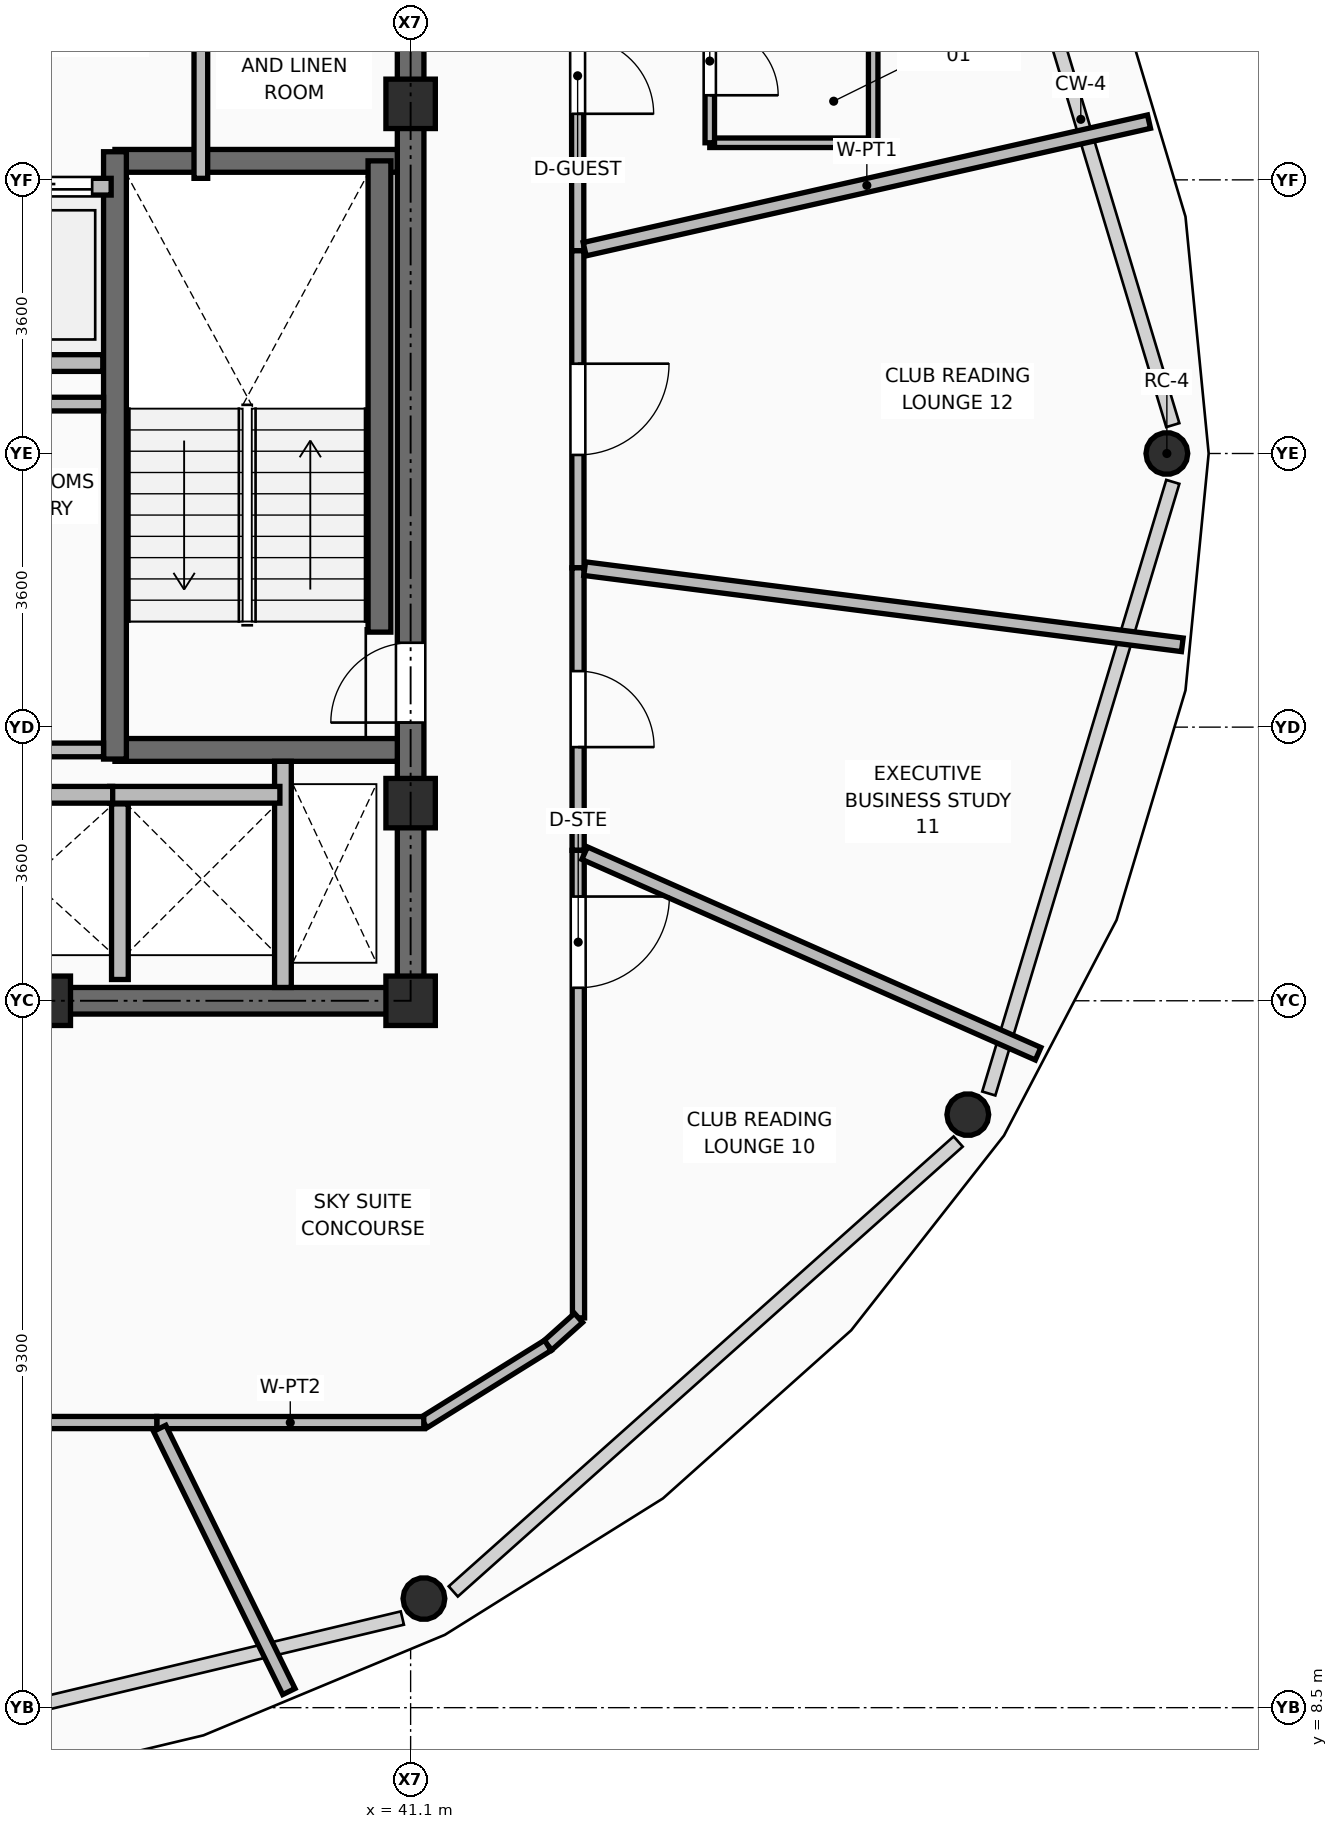
"""IFC4 building model, lengths in metres.
Left out: names, types, materials, properties, quantities, classifications, styles, units other than length and angle.
Written with IfcOpenShell. Run it as: python <this file> out.ifc"""

import sys

from ifc_helpers import new_model, si_unit, direction, frame, frame_2d, origin, origin_2d, place, context, subcontext, project, spatial, rectangle, hollow_circle, extrude, element, fill, save


model = new_model("IFC4")
c1 = context("Model", 3, precision=1e-05, world=origin(), true_north=direction((0.0, 1.0)))
c2 = subcontext(c1, "Body", "Model", "MODEL_VIEW")
j1 = project(units=[si_unit("LENGTHUNIT", "METRE"), si_unit("PLANEANGLEUNIT", "RADIAN")], contexts=[c1])
p1 = place(None, origin())
s1 = spatial("IfcSite", under=j1, at=p1, CompositionType="ELEMENT")
p2 = place(p1, origin())
s2 = spatial("IfcBuilding", under=s1, at=p2, CompositionType="ELEMENT")
p3 = place(p2, frame((0.0, 0.0, 278.85)))
s3 = spatial("IfcBuildingStorey", under=s2, at=p3, CompositionType="ELEMENT", Elevation=278.85)
for number, where, z_axis, x_axis in (
    (1, (36.3, 17.8, 0.0), (0.0, 0.0, 1.0), (1.0, 0.0, 0.0)),
    (2, (41.1, 17.8, 0.0), (0.0, 0.0, 1.0), (1.0, 0.0, 0.0)),
    (3, (41.1, 20.4, 0.0), (0.0, 0.0, 1.0), (1.0, 0.0, 0.0)),
    (4, (41.1, 29.6, 0.0), (0.0, 0.0, 1.0), (1.0, 0.0, 0.0)),
):
    element("IfcColumn", number, at=place(p3, frame(where, z_axis=z_axis, x_axis=x_axis)), inside=s3, PredefinedType="COLUMN", context=c2, shape_type="SweptSolid", body=[
        extrude(rectangle(XDim=0.65, YDim=0.65, at=origin_2d()), origin(), (0.0, 0.0, 1.0), 3.75),
    ])
p4 = place(p3, frame((51.05, 25.0, 0.0), z_axis=(-0.213469718958, 0.0, 0.97694968094), x_axis=(0.0, -1.0, 0.0)))
e5 = element("IfcColumn", 5, at=p4, inside=s3, PredefinedType="COLUMN", context=c2, shape_type="SweptSolid", body=[
    extrude(hollow_circle(Radius=0.275, WallThickness=0.025, at=origin_2d()), origin(), (0.0, 0.0, 1.0), 3.654),
])
p5 = place(p3, frame((41.275, 9.935, 0.0), z_axis=(-0.107078897733, 0.165345373706, 0.980405537038), x_axis=(-0.839360059296, -0.543575837265, 0.0)))
e6 = element("IfcColumn", 6, at=p5, inside=s3, PredefinedType="COLUMN", context=c2, shape_type="SweptSolid", body=[
    extrude(hollow_circle(Radius=0.275, WallThickness=0.025, at=origin_2d()), origin(), (0.0, 0.0, 1.0), 3.641),
])
p6 = place(p3, frame((48.431, 16.302, 0.0), z_axis=(-0.185218066702, 0.09531807333, 0.978063767177), x_axis=(-0.457587432232, -0.889164631474, 0.0)))
e7 = element("IfcColumn", 7, at=p6, inside=s3, PredefinedType="COLUMN", context=c2, shape_type="SweptSolid", body=[
    extrude(hollow_circle(Radius=0.275, WallThickness=0.025, at=origin_2d()), origin(), (0.0, 0.0, 1.0), 3.65),
])
p7 = place(p3, frame((37.275, 18.08, 0.0), z_axis=(0.0, 0.0, 1.0), x_axis=(0.0, 1.0, 0.0)))
e8 = element("IfcWall", 8, at=p7, inside=s3, PredefinedType="PARTITIONING", context=c2, shape_type="SweptSolid", body=[
    extrude(rectangle(XDim=2.31, YDim=0.22, at=frame_2d((1.155, 0.0))), origin(), (0.0, 0.0, 1.0), 3.545),
])
p8 = place(p3, frame((34.91, 26.19, 0.0), z_axis=(0.0, 0.0, 1.0), x_axis=(1.0, 0.0, 0.0)))
e9 = element("IfcWall", 9, at=p8, inside=s3, PredefinedType="PARTITIONING", context=c2, shape_type="SweptSolid", body=[
    extrude(rectangle(XDim=2.14, YDim=0.22, at=frame_2d((1.07, 0.0))), origin(), (0.0, 0.0, 1.0), 3.545),
])
p9 = place(p3, frame((34.95, 17.8, 0.0), z_axis=(0.0, 0.0, 1.0), x_axis=(1.0, 0.0, 0.0)))
e10 = element("IfcWall", 10, at=p9, inside=s3, PredefinedType="SHEAR", context=c2, shape_type="SweptSolid", body=[
    extrude(rectangle(XDim=6.325, YDim=0.35, at=frame_2d((3.163, 0.0))), origin(), (0.0, 0.0, 1.0), 3.57),
])
p10 = place(p3, frame((41.1, 17.975, 0.0), z_axis=(0.0, 0.0, 1.0), x_axis=(0.0, 1.0, 0.0)))
e11 = element("IfcWall", 11, at=p10, inside=s3, PredefinedType="SHEAR", context=c2, shape_type="SweptSolid", body=[
    extrude(rectangle(XDim=14.3, YDim=0.35, at=frame_2d((7.15, 0.0))), origin(), (0.0, 0.0, 1.0), 3.57),
])
p11 = place(p10, frame((3.485, 0.0, 0.0)))
e12 = element("IfcOpeningElement", 12, at=p11, cuts=e11, PredefinedType="OPENING", context=c2, shape_type="SweptSolid", body=[
    extrude(rectangle(XDim=1.05, YDim=2.1, at=frame_2d((0.525, 1.05))), frame((0.0, 0.185, 0.0), z_axis=(0.0, -1.0, 0.0), x_axis=(1.0, 0.0, 0.0)), (0.0, 0.0, 1.0), 0.37),
])
for number, where, z_axis, x_axis in (
    (13, (37.21, 21.1, 0.0), (0.0, 0.0, 1.0), (1.0, 0.0, 0.0)),
    (14, (37.21, 28.85, 0.0), (0.0, 0.0, 1.0), (1.0, 0.0, 0.0)),
):
    element("IfcWall", number, at=place(p3, frame(where, z_axis=z_axis, x_axis=x_axis)), inside=s3, PredefinedType="SHEAR", context=c2, shape_type="SweptSolid", body=[
        extrude(rectangle(XDim=3.715, YDim=0.3, at=frame_2d((1.857, 0.0))), origin(), (0.0, 0.0, 1.0), 3.57),
    ])
p12 = place(p3, frame((37.21, 20.98, 0.0), z_axis=(0.0, 0.0, 1.0), x_axis=(0.0, 1.0, 0.0)))
e15 = element("IfcWall", 15, at=p12, inside=s3, PredefinedType="SHEAR", context=c2, shape_type="SweptSolid", body=[
    extrude(rectangle(XDim=7.99, YDim=0.3, at=frame_2d((3.995, 0.0))), origin(), (0.0, 0.0, 1.0), 3.57),
])
p13 = place(p3, frame((40.69, 22.65, 0.0), z_axis=(0.0, 0.0, 1.0), x_axis=(0.0, 1.0, 0.0)))
e16 = element("IfcWall", 16, at=p13, inside=s3, PredefinedType="SHEAR", context=c2, shape_type="SweptSolid", body=[
    extrude(rectangle(XDim=6.2, YDim=0.3, at=frame_2d((3.1, 0.0))), origin(), (0.0, 0.0, 1.0), 3.57),
])
p14 = place(p3, frame((39.42, 17.975, 0.0), z_axis=(0.0, 0.0, 1.0), x_axis=(0.0, 1.0, 0.0)))
e17 = element("IfcWall", 17, at=p14, inside=s3, PredefinedType="PARTITIONING", context=c2, shape_type="SweptSolid", body=[
    extrude(rectangle(XDim=2.975, YDim=0.22, at=frame_2d((1.487, 0.0))), origin(), (0.0, 0.0, 1.0), 3.132),
])
for number, where, z_axis, x_axis in (
    (18, (37.14, 20.51, 0.0), (0.0, 0.0, 1.0), (1.0, 0.0, 0.0)),
    (19, (34.94, 20.51, 0.0), (0.0, 0.0, 1.0), (1.0, 0.0, 0.0)),
):
    element("IfcWall", number, at=place(p3, frame(where, z_axis=z_axis, x_axis=x_axis)), inside=s3, PredefinedType="PARTITIONING", context=c2, shape_type="SweptSolid", body=[
        extrude(rectangle(XDim=2.24, YDim=0.22, at=frame_2d((1.12, 0.0))), origin(), (0.0, 0.0, 1.0), 3.55),
    ])
p15 = place(p3, frame((35.56, 28.51, 0.0), z_axis=(0.0, 0.0, 1.0), x_axis=(1.0, 0.0, 0.0)))
e20 = element("IfcWall", 20, at=p15, inside=s3, PredefinedType="PARTITIONING", context=c2, shape_type="SweptSolid", body=[
    extrude(rectangle(XDim=1.6, YDim=0.22, at=frame_2d((0.8, 0.0))), origin(), (0.0, 0.0, 1.0), 3.55),
])
p16 = place(p15, frame((0.25, 0.0, 0.0)))
e21 = element("IfcOpeningElement", 21, at=p16, cuts=e20, PredefinedType="OPENING", context=c2, shape_type="SweptSolid", body=[
    extrude(rectangle(XDim=1.1, YDim=2.2, at=frame_2d((0.55, 1.1))), frame((0.0, 0.12, 0.0), z_axis=(0.0, -1.0, 0.0), x_axis=(1.0, 0.0, 0.0)), (0.0, 0.0, 1.0), 0.24),
])
p17 = place(p3, frame((34.98, 21.1, 0.0), z_axis=(0.0, 0.0, 1.0), x_axis=(1.0, 0.0, 0.0)))
e22 = element("IfcWall", 22, at=p17, inside=s3, PredefinedType="PARTITIONING", context=c2, shape_type="SweptSolid", body=[
    extrude(rectangle(XDim=2.08, YDim=0.18, at=frame_2d((1.04, 0.0))), origin(), (0.0, 0.0, 1.0), 3.55),
])
p18 = place(p3, frame((34.72, 25.65, 0.0), z_axis=(0.0, 0.0, 1.0), x_axis=(1.0, 0.0, 0.0)))
e23 = element("IfcWall", 23, at=p18, inside=s3, PredefinedType="PARTITIONING", context=c2, shape_type="SweptSolid", body=[
    extrude(rectangle(XDim=2.34, YDim=0.18, at=frame_2d((1.17, 0.0))), origin(), (0.0, 0.0, 1.0), 3.55),
])
p19 = place(p3, frame((38.34, 28.62, 0.0), z_axis=(0.0, 0.0, 1.0), x_axis=(0.0, 1.0, 0.0)))
e24 = element("IfcWall", 24, at=p19, inside=s3, PredefinedType="PARTITIONING", context=c2, shape_type="SweptSolid", body=[
    extrude(rectangle(XDim=3.655, YDim=0.18, at=frame_2d((1.827, 0.0))), origin(), (0.0, 0.0, 1.0), 3.132),
])
p20 = place(p3, frame((43.294, 34.66, 0.0), z_axis=(0.0, 0.0, 1.0), x_axis=(0.000733163229, -0.999999731236, 0.0)))
e25 = element("IfcWall", 25, at=p20, inside=s3, PredefinedType="PARTITIONING", context=c2, shape_type="SweptSolid", body=[
    extrude(rectangle(XDim=6.993, YDim=0.16, at=frame_2d((3.497, 0.0))), origin(), (0.0, 0.0, 1.0), 3.132),
])
p21 = place(p20, frame((4.191, 0.0, 0.0)))
e26 = element("IfcOpeningElement", 26, at=p21, cuts=e25, PredefinedType="OPENING", context=c2, shape_type="SweptSolid", body=[
    extrude(rectangle(XDim=1.0, YDim=2.1, at=frame_2d((0.5, 1.05))), frame((0.0, 0.09, 0.0), z_axis=(0.0, -1.0, 0.0), x_axis=(1.0, 0.0, 0.0)), (0.0, 0.0, 1.0), 0.18),
])
p22 = place(p3, frame((43.299, 27.667, 0.0), z_axis=(0.0, 0.0, 1.0), x_axis=(0.00070241144, -0.999999753309, 0.0)))
e27 = element("IfcWall", 27, at=p22, inside=s3, PredefinedType="PARTITIONING", context=c2, shape_type="SweptSolid", body=[
    extrude(rectangle(XDim=4.171, YDim=0.16, at=frame_2d((2.085, 0.0))), origin(), (0.0, 0.0, 1.0), 3.55),
])
p23 = place(p22, frame((1.486, 0.0, 0.0)))
e28 = element("IfcOpeningElement", 28, at=p23, cuts=e27, PredefinedType="OPENING", context=c2, shape_type="SweptSolid", body=[
    extrude(rectangle(XDim=1.2, YDim=2.1, at=frame_2d((0.6, 1.05))), frame((0.0, 0.09, 0.0), z_axis=(0.0, -1.0, 0.0), x_axis=(1.0, 0.0, 0.0)), (0.0, 0.0, 1.0), 0.18),
])
p24 = place(p3, frame((43.302, 23.496, 0.0), z_axis=(0.0, 0.0, 1.0), x_axis=(0.000525451487, -0.99999986195, 0.0)))
e29 = element("IfcWall", 29, at=p24, inside=s3, PredefinedType="PARTITIONING", context=c2, shape_type="SweptSolid", body=[
    extrude(rectangle(XDim=3.717, YDim=0.16, at=frame_2d((1.858, 0.0))), origin(), (0.0, 0.0, 1.0), 3.132),
])
p25 = place(p24, frame((1.359, 0.0, 0.0)))
e30 = element("IfcOpeningElement", 30, at=p25, cuts=e29, PredefinedType="OPENING", context=c2, shape_type="SweptSolid", body=[
    extrude(rectangle(XDim=1.0, YDim=2.1, at=frame_2d((0.5, 1.05))), frame((0.0, 0.09, 0.0), z_axis=(0.0, -1.0, 0.0), x_axis=(1.0, 0.0, 0.0)), (0.0, 0.0, 1.0), 0.18),
])
p26 = place(p3, frame((43.304, 19.779, 0.0), z_axis=(0.0, 0.0, 1.0), x_axis=(0.000833498421, -0.99999965264, 0.0)))
e31 = element("IfcWall", 31, at=p26, inside=s3, PredefinedType="PARTITIONING", context=c2, shape_type="SweptSolid", body=[
    extrude(rectangle(XDim=6.151, YDim=0.16, at=frame_2d((3.076, 0.0))), origin(), (0.0, 0.0, 1.0), 3.132),
])
p27 = place(p26, frame((0.608, 0.0, 0.0)))
e32 = element("IfcOpeningElement", 32, at=p27, cuts=e31, PredefinedType="OPENING", context=c2, shape_type="SweptSolid", body=[
    extrude(rectangle(XDim=1.2, YDim=2.1, at=frame_2d((0.6, 1.05))), frame((0.0, 0.09, 0.0), z_axis=(0.0, -1.0, 0.0), x_axis=(1.0, 0.0, 0.0)), (0.0, 0.0, 1.0), 0.18),
])
p28 = place(p3, frame((43.309, 13.628, 0.0), z_axis=(0.0, 0.0, 1.0), x_axis=(-0.744970479635, -0.667097432519, 0.0)))
e33 = element("IfcWall", 33, at=p28, inside=s3, PredefinedType="PARTITIONING", context=c2, shape_type="SweptSolid", body=[
    extrude(rectangle(XDim=0.542, YDim=0.16, at=frame_2d((0.271, 0.0))), origin(), (0.0, 0.0, 1.0), 3.55),
])
p29 = place(p3, frame((42.905, 13.266, 0.0), z_axis=(0.0, 0.0, 1.0), x_axis=(-0.84891733462, -0.528525646475, 0.0)))
e34 = element("IfcWall", 34, at=p29, inside=s3, PredefinedType="PARTITIONING", context=c2, shape_type="SweptSolid", body=[
    extrude(rectangle(XDim=1.923, YDim=0.16, at=frame_2d((0.961, 0.0))), origin(), (0.0, 0.0, 1.0), 3.55),
])
p30 = place(p3, frame((41.273, 12.25, 0.0), z_axis=(0.0, 0.0, 1.0), x_axis=(-0.999999961361, 0.000277990121, 0.0)))
e35 = element("IfcWall", 35, at=p30, inside=s3, PredefinedType="PARTITIONING", context=c2, shape_type="SweptSolid", body=[
    extrude(rectangle(XDim=3.513, YDim=0.16, at=frame_2d((1.756, 0.0))), origin(), (0.0, 0.0, 1.0), 3.132),
])
p31 = place(p3, frame((37.76, 12.251, 0.0), z_axis=(0.0, 0.0, 1.0), x_axis=(-0.99999995947, 0.000284711007, 0.0)))
e36 = element("IfcWall", 36, at=p31, inside=s3, PredefinedType="PARTITIONING", context=c2, shape_type="SweptSolid", body=[
    extrude(rectangle(XDim=10.29, YDim=0.16, at=frame_2d((5.145, 0.0))), origin(), (0.0, 0.0, 1.0), 3.132),
])
p32 = place(p31, frame((4.619, 0.0, 0.0)))
e37 = element("IfcOpeningElement", 37, at=p32, cuts=e36, PredefinedType="OPENING", context=c2, shape_type="SweptSolid", body=[
    extrude(rectangle(XDim=1.2, YDim=2.1, at=frame_2d((0.6, 1.05))), frame((0.0, 0.09, 0.0), z_axis=(0.0, -1.0, 0.0), x_axis=(1.0, 0.0, 0.0)), (0.0, 0.0, 1.0), 0.18),
])
p33 = place(p3, frame((43.39, 27.688, 0.0), z_axis=(0.0, 0.0, 1.0), x_axis=(0.975402755126, 0.220430182356, 0.0)))
e38 = element("IfcWall", 38, at=p33, inside=s3, PredefinedType="PARTITIONING", context=c2, shape_type="SweptSolid", body=[
    extrude(rectangle(XDim=7.612, YDim=0.18, at=frame_2d((3.806, 0.0))), origin(), (0.0, 0.0, 1.0), 3.003),
])
p34 = place(p3, frame((37.798, 12.175, 0.0), z_axis=(0.0, 0.0, 1.0), x_axis=(0.440645375208, -0.897681264875, 0.0)))
e39 = element("IfcWall", 39, at=p34, inside=s3, PredefinedType="PARTITIONING", context=c2, shape_type="SweptSolid", body=[
    extrude(rectangle(XDim=3.858, YDim=0.18, at=frame_2d((1.929, 0.0))), origin(), (0.0, 0.0, 1.0), 3.003),
])
p35 = place(p3, frame((43.39, 19.742, 0.0), z_axis=(0.0, 0.0, 1.0), x_axis=(0.914530811629, -0.404516247612, 0.0)))
e40 = element("IfcWall", 40, at=p35, inside=s3, PredefinedType="PARTITIONING", context=c2, shape_type="SweptSolid", body=[
    extrude(rectangle(XDim=6.524, YDim=0.18, at=frame_2d((3.262, 0.0))), origin(), (0.0, 0.0, 1.0), 3.003),
])
p36 = place(p3, frame((43.39, 23.485, 0.0), z_axis=(0.0, 0.0, 1.0), x_axis=(0.991975030928, -0.126433927468, 0.0)))
e41 = element("IfcWall", 41, at=p36, inside=s3, PredefinedType="PARTITIONING", context=c2, shape_type="SweptSolid", body=[
    extrude(rectangle(XDim=7.927, YDim=0.18, at=frame_2d((3.963, 0.0))), origin(), (0.0, 0.0, 1.0), 3.003),
])
p37 = place(p3, frame((45.036, 29.088, 0.0), z_axis=(0.0, 0.0, 1.0), x_axis=(1.0, 0.0, 0.0)))
e42 = element("IfcWall", 42, at=p37, inside=s3, PredefinedType="PARTITIONING", context=c2, shape_type="SweptSolid", body=[
    extrude(rectangle(XDim=2.15, YDim=0.125, at=frame_2d((1.075, 0.0))), origin(), (0.0, 0.0, 1.0), 3.55),
])
p38 = place(p3, frame((45.036, 29.088, 0.0), z_axis=(0.0, 0.0, 1.0), x_axis=(0.0, 1.0, 0.0)))
e43 = element("IfcWall", 43, at=p38, inside=s3, PredefinedType="PARTITIONING", context=c2, shape_type="SweptSolid", body=[
    extrude(rectangle(XDim=2.15, YDim=0.125, at=frame_2d((1.075, 0.0))), origin(), (0.0, 0.0, 1.0), 3.55),
])
p39 = place(p38, frame((0.625, 0.0, 0.0)))
e44 = element("IfcOpeningElement", 44, at=p39, cuts=e43, PredefinedType="OPENING", context=c2, shape_type="SweptSolid", body=[
    extrude(rectangle(XDim=0.9, YDim=2.1, at=frame_2d((0.45, 1.05))), frame((0.0, 0.073, 0.0), z_axis=(0.0, -1.0, 0.0), x_axis=(1.0, 0.0, 0.0)), (0.0, 0.0, 1.0), 0.145),
])
p40 = place(p3, frame((47.186, 29.088, 0.0), z_axis=(0.0, 0.0, 1.0), x_axis=(0.0, 1.0, 0.0)))
e45 = element("IfcWall", 45, at=p40, inside=s3, PredefinedType="PARTITIONING", context=c2, shape_type="SweptSolid", body=[
    extrude(rectangle(XDim=2.15, YDim=0.125, at=frame_2d((1.075, 0.0))), origin(), (0.0, 0.0, 1.0), 3.55),
])
p41 = place(p11, origin())
e46 = element("IfcDoor", 46, at=p41, inside=s3, OperationType="SINGLE_SWING_LEFT", PredefinedType="DOOR", context=c2, shape_type="SweptSolid", body=[
    extrude(rectangle(XDim=1.05, YDim=2.1, at=frame_2d((0.525, 1.05))), frame((0.0, 0.025, 0.0), z_axis=(0.0, -1.0, 0.0), x_axis=(1.0, 0.0, 0.0)), (0.0, 0.0, 1.0), 0.05),
])
fill(e12, e46)
p42 = place(p16, origin())
e47 = element("IfcDoor", 47, at=p42, inside=s3, OperationType="DOUBLE_DOOR_SLIDING", PredefinedType="DOOR", context=c2, shape_type="SweptSolid", body=[
    extrude(rectangle(XDim=1.1, YDim=2.2, at=frame_2d((0.55, 1.1))), frame((0.0, 0.025, 0.0), z_axis=(0.0, -1.0, 0.0), x_axis=(1.0, 0.0, 0.0)), (0.0, 0.0, 1.0), 0.05),
])
fill(e21, e47)
p43 = place(p39, frame((0.9, 0.0, 0.0), z_axis=(0.0, 0.0, 1.0), x_axis=(-1.0, 0.0, 0.0)))
e48 = element("IfcDoor", 48, at=p43, inside=s3, OperationType="SINGLE_SWING_RIGHT", PredefinedType="DOOR", context=c2, shape_type="SweptSolid", body=[
    extrude(rectangle(XDim=0.9, YDim=2.1, at=frame_2d((0.45, 1.05))), frame((0.0, 0.025, 0.0), z_axis=(0.0, -1.0, 0.0), x_axis=(1.0, 0.0, 0.0)), (0.0, 0.0, 1.0), 0.05),
])
fill(e44, e48)
p44 = place(p21, origin())
e49 = element("IfcDoor", 49, at=p44, inside=s3, OperationType="SINGLE_SWING_RIGHT", PredefinedType="DOOR", context=c2, shape_type="SweptSolid", body=[
    extrude(rectangle(XDim=1.0, YDim=2.1, at=frame_2d((0.5, 1.05))), frame((0.0, 0.025, 0.0), z_axis=(0.0, -1.0, 0.0), x_axis=(1.0, 0.0, 0.0)), (0.0, 0.0, 1.0), 0.05),
])
fill(e26, e49)
p45 = place(p27, origin())
e50 = element("IfcDoor", 50, at=p45, inside=s3, OperationType="SINGLE_SWING_LEFT", PredefinedType="DOOR", context=c2, shape_type="SweptSolid", body=[
    extrude(rectangle(XDim=1.2, YDim=2.1, at=frame_2d((0.6, 1.05))), frame((0.0, 0.025, 0.0), z_axis=(0.0, -1.0, 0.0), x_axis=(1.0, 0.0, 0.0)), (0.0, 0.0, 1.0), 0.05),
])
fill(e32, e50)
p46 = place(p25, origin())
e51 = element("IfcDoor", 51, at=p46, inside=s3, OperationType="SINGLE_SWING_RIGHT", PredefinedType="DOOR", context=c2, shape_type="SweptSolid", body=[
    extrude(rectangle(XDim=1.0, YDim=2.1, at=frame_2d((0.5, 1.05))), frame((0.0, 0.025, 0.0), z_axis=(0.0, -1.0, 0.0), x_axis=(1.0, 0.0, 0.0)), (0.0, 0.0, 1.0), 0.05),
])
fill(e30, e51)
p47 = place(p23, origin())
e52 = element("IfcDoor", 52, at=p47, inside=s3, OperationType="SINGLE_SWING_LEFT", PredefinedType="DOOR", context=c2, shape_type="SweptSolid", body=[
    extrude(rectangle(XDim=1.2, YDim=2.1, at=frame_2d((0.6, 1.05))), frame((0.0, 0.025, 0.0), z_axis=(0.0, -1.0, 0.0), x_axis=(1.0, 0.0, 0.0)), (0.0, 0.0, 1.0), 0.05),
])
fill(e28, e52)
save(model, sys.argv[1])
